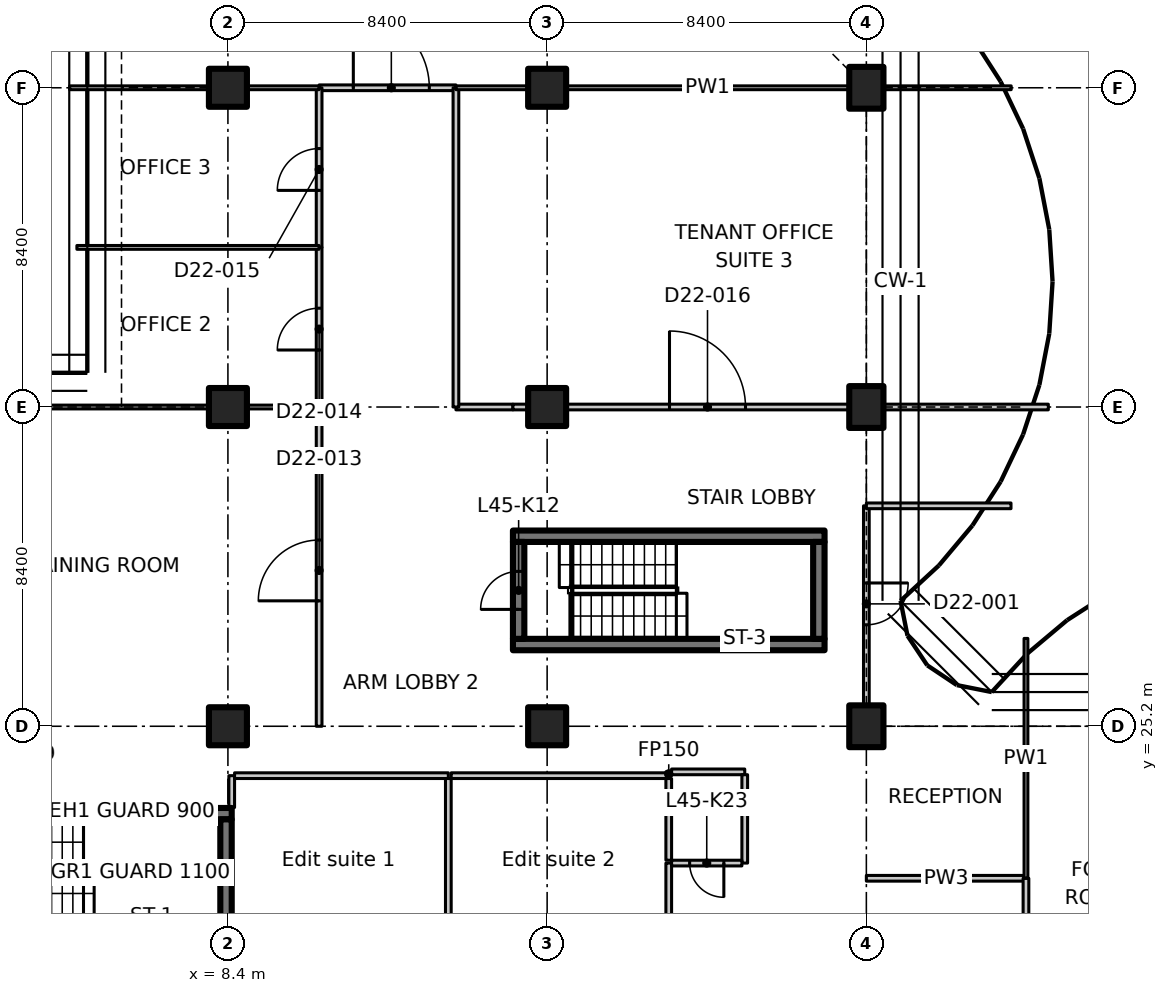
"""IFC4 building model, lengths in metres.
Left out: names, types, materials, properties, quantities, classifications, styles, units other than length and angle.
Written with IfcOpenShell. Run it as: python <this file> out.ifc"""

import sys

from ifc_helpers import new_model, si_unit, direction, frame, frame_2d, origin, origin_2d, place, context, subcontext, project, spatial, polyline, rectangle, outline, extrude, element, fill, save


model = new_model("IFC4")
c1 = context("Model", 3, precision=1e-05, world=origin(), true_north=direction((0.0, 1.0)))
c2 = subcontext(c1, "Body", "Model", "MODEL_VIEW")
j1 = project(units=[si_unit("LENGTHUNIT", "METRE"), si_unit("PLANEANGLEUNIT", "RADIAN")], contexts=[c1])
p1 = place(None, origin())
s1 = spatial("IfcSite", under=j1, at=p1, CompositionType="ELEMENT")
p2 = place(p1, origin())
s2 = spatial("IfcBuilding", under=s1, at=p2, CompositionType="ELEMENT")
p3 = place(p2, frame((0.0, 0.0, 181.2)))
s3 = spatial("IfcBuildingStorey", under=s2, at=p3, CompositionType="ELEMENT", Elevation=181.2)
for number, where, z_axis, x_axis in (
    (1, (8.4, 25.2, 0.0), (0.0, 0.0, 1.0), (1.0, 0.0, 0.0)),
    (2, (8.4, 33.6, 0.0), (0.0, 0.0, 1.0), (1.0, 0.0, 0.0)),
    (3, (8.4, 42.0, 0.0), (0.0, 0.0, 1.0), (1.0, 0.0, 0.0)),
    (4, (16.8, 25.2, 0.0), (0.0, 0.0, 1.0), (1.0, 0.0, 0.0)),
    (5, (16.8, 33.6, 0.0), (0.0, 0.0, 1.0), (1.0, 0.0, 0.0)),
    (6, (16.8, 42.0, 0.0), (0.0, 0.0, 1.0), (1.0, 0.0, 0.0)),
):
    element("IfcColumn", number, at=place(p3, frame(where, z_axis=z_axis, x_axis=x_axis)), inside=s3, PredefinedType="COLUMN", context=c2, shape_type="SweptSolid", body=[
        extrude(rectangle(XDim=1.0, YDim=1.0, at=origin_2d()), origin(), (0.0, 0.0, 1.0), 3.35),
    ])
for number, where, z_axis, x_axis in (
    (7, (25.2, 25.2, 0.0), (0.0, 0.0, 1.0), (1.0, 0.0, 0.0)),
    (8, (25.2, 33.6, 0.0), (0.0, 0.0, 1.0), (1.0, 0.0, 0.0)),
    (9, (25.2, 42.0, 0.0), (0.0, 0.0, 1.0), (1.0, 0.0, 0.0)),
):
    element("IfcColumn", number, at=place(p3, frame(where, z_axis=z_axis, x_axis=x_axis)), inside=s3, PredefinedType="COLUMN", context=c2, shape_type="SweptSolid", body=[
        extrude(rectangle(XDim=0.9, YDim=1.1, at=origin_2d()), origin(), (0.0, 0.0, 1.0), 3.35),
    ])
p4 = place(p3, frame((0.3, 22.9, 0.0), z_axis=(0.0, 0.0, 1.0), x_axis=(1.0, 0.0, 0.0)))
e10 = element("IfcWall", 10, at=p4, inside=s3, PredefinedType="SHEAR", context=c2, shape_type="SweptSolid", body=[
    extrude(rectangle(XDim=8.2, YDim=0.3, at=frame_2d((4.1, 0.0))), origin(), (0.0, 0.0, 1.0), 3.35),
])
p5 = place(p4, frame((0.4, 0.0, 0.0)))
e11 = element("IfcOpeningElement", 11, at=p5, cuts=e10, PredefinedType="OPENING", context=c2, shape_type="SweptSolid", body=[
    extrude(rectangle(XDim=1.0, YDim=2.1, at=frame_2d((0.5, 1.05))), frame((0.0, 0.16, 0.0), z_axis=(0.0, -1.0, 0.0), x_axis=(1.0, 0.0, 0.0)), (0.0, 0.0, 1.0), 0.32),
])
p6 = place(p3, frame((8.35, 20.2, 0.0), z_axis=(0.0, 0.0, 1.0), x_axis=(0.0, 1.0, 0.0)))
e12 = element("IfcWall", 12, at=p6, inside=s3, PredefinedType="SHEAR", context=c2, shape_type="SweptSolid", body=[
    extrude(rectangle(XDim=2.55, YDim=0.3, at=frame_2d((1.275, 0.0))), origin(), (0.0, 0.0, 1.0), 3.35),
])
for number, where, z_axis, x_axis in (
    (13, (15.9, 27.35, 0.0), (0.0, 0.0, 1.0), (1.0, 0.0, 0.0)),
    (14, (15.9, 30.2, 0.0), (0.0, 0.0, 1.0), (1.0, 0.0, 0.0)),
):
    element("IfcWall", number, at=place(p3, frame(where, z_axis=z_axis, x_axis=x_axis)), inside=s3, PredefinedType="SHEAR", context=c2, shape_type="SweptSolid", body=[
        extrude(rectangle(XDim=8.2, YDim=0.3, at=frame_2d((4.1, 0.0))), origin(), (0.0, 0.0, 1.0), 3.35),
    ])
p7 = place(p3, frame((16.05, 27.5, 0.0), z_axis=(0.0, 0.0, 1.0), x_axis=(0.0, 1.0, 0.0)))
e15 = element("IfcWall", 15, at=p7, inside=s3, PredefinedType="SHEAR", context=c2, shape_type="SweptSolid", body=[
    extrude(rectangle(XDim=2.55, YDim=0.3, at=frame_2d((1.275, 0.0))), origin(), (0.0, 0.0, 1.0), 3.35),
])
p8 = place(p7, frame((0.775, 0.0, 0.0)))
e16 = element("IfcOpeningElement", 16, at=p8, cuts=e15, PredefinedType="OPENING", context=c2, shape_type="SweptSolid", body=[
    extrude(rectangle(XDim=1.0, YDim=2.1, at=frame_2d((0.5, 1.05))), frame((0.0, 0.16, 0.0), z_axis=(0.0, -1.0, 0.0), x_axis=(1.0, 0.0, 0.0)), (0.0, 0.0, 1.0), 0.32),
])
p9 = place(p3, frame((23.95, 27.5, 0.0), z_axis=(0.0, 0.0, 1.0), x_axis=(0.0, 1.0, 0.0)))
e17 = element("IfcWall", 17, at=p9, inside=s3, PredefinedType="SHEAR", context=c2, shape_type="SweptSolid", body=[
    extrude(rectangle(XDim=2.55, YDim=0.3, at=frame_2d((1.275, 0.0))), origin(), (0.0, 0.0, 1.0), 3.35),
])
p10 = place(p3, frame((8.5, 23.062, 0.0), z_axis=(0.0, 0.0, 1.0), x_axis=(0.0, 1.0, 0.0)))
e18 = element("IfcWall", 18, at=p10, inside=s3, PredefinedType="PARTITIONING", context=c2, shape_type="SweptSolid", body=[
    extrude(rectangle(XDim=0.838, YDim=0.15, at=frame_2d((0.419, 0.0))), origin(), (0.0, 0.0, 1.0), 3.35),
])
p11 = place(p3, frame((8.575, 23.9, 0.0), z_axis=(0.0, 0.0, 1.0), x_axis=(1.0, 0.0, 0.0)))
e19 = element("IfcWall", 19, at=p11, inside=s3, PredefinedType="PARTITIONING", context=c2, shape_type="SweptSolid", body=[
    extrude(rectangle(XDim=5.625, YDim=0.15, at=frame_2d((2.812, 0.0))), origin(), (0.0, 0.0, 1.0), 3.35),
])
p12 = place(p3, frame((20.0, 21.6, 0.0), z_axis=(0.0, 0.0, 1.0), x_axis=(0.0, -1.0, 0.0)))
e20 = element("IfcWall", 20, at=p12, inside=s3, PredefinedType="PARTITIONING", context=c2, shape_type="SweptSolid", body=[
    extrude(rectangle(XDim=2.2, YDim=0.15, at=frame_2d((1.1, 0.0))), origin(), (0.0, 0.0, 1.0), 3.35),
])
p13 = place(p3, frame((14.2, 23.825, 0.0), z_axis=(0.0, 0.0, 1.0), x_axis=(0.0, -1.0, 0.0)))
e21 = element("IfcWall", 21, at=p13, inside=s3, PredefinedType="PARTITIONING", context=c2, shape_type="SweptSolid", body=[
    extrude(rectangle(XDim=4.35, YDim=0.15, at=frame_2d((2.175, 0.0))), origin(), (0.0, 0.0, 1.0), 3.35),
])
p14 = place(p3, frame((14.275, 23.9, 0.0), z_axis=(0.0, 0.0, 1.0), x_axis=(1.0, 0.0, 0.0)))
e22 = element("IfcWall", 22, at=p14, inside=s3, PredefinedType="PARTITIONING", context=c2, shape_type="SweptSolid", body=[
    extrude(rectangle(XDim=5.725, YDim=0.15, at=frame_2d((2.863, 0.0))), origin(), (0.0, 0.0, 1.0), 3.35),
])
p15 = place(p3, frame((20.0, 23.9, 0.0), z_axis=(0.0, 0.0, 1.0), x_axis=(0.0, 1.0, 0.0)))
e23 = element("IfcWall", 23, at=p15, inside=s3, PredefinedType="PARTITIONING", context=c2, shape_type="SweptSolid", body=[
    extrude(rectangle(XDim=0.1, YDim=0.15, at=frame_2d((0.05, 0.0))), origin(), (0.0, 0.0, 1.0), 3.35),
])
p16 = place(p3, frame((20.075, 24.0, 0.0), z_axis=(0.0, 0.0, 1.0), x_axis=(1.0, 0.0, 0.0)))
e24 = element("IfcWall", 24, at=p16, inside=s3, PredefinedType="PARTITIONING", context=c2, shape_type="SweptSolid", body=[
    extrude(rectangle(XDim=1.925, YDim=0.15, at=frame_2d((0.962, 0.0))), origin(), (0.0, 0.0, 1.0), 3.35),
])
p17 = place(p3, frame((22.0, 23.925, 0.0), z_axis=(0.0, 0.0, 1.0), x_axis=(0.0, -1.0, 0.0)))
e25 = element("IfcWall", 25, at=p17, inside=s3, PredefinedType="PARTITIONING", context=c2, shape_type="SweptSolid", body=[
    extrude(rectangle(XDim=2.325, YDim=0.15, at=frame_2d((1.163, 0.0))), origin(), (0.0, 0.0, 1.0), 3.35),
])
p18 = place(p3, frame((21.925, 21.6, 0.0), z_axis=(0.0, 0.0, 1.0), x_axis=(-1.0, 0.0, 0.0)))
e26 = element("IfcWall", 26, at=p18, inside=s3, PredefinedType="PARTITIONING", context=c2, shape_type="SweptSolid", body=[
    extrude(rectangle(XDim=1.85, YDim=0.15, at=frame_2d((0.925, 0.0))), origin(), (0.0, 0.0, 1.0), 3.35),
])
p19 = place(p18, frame((0.475, 0.0, 0.0)))
e27 = element("IfcOpeningElement", 27, at=p19, cuts=e26, PredefinedType="OPENING", context=c2, shape_type="SweptSolid", body=[
    extrude(rectangle(XDim=0.9, YDim=2.1, at=frame_2d((0.45, 1.05))), frame((0.0, 0.085, 0.0), z_axis=(0.0, -1.0, 0.0), x_axis=(1.0, 0.0, 0.0)), (0.0, 0.0, 1.0), 0.17),
])
p20 = place(p3, frame((20.0, 21.675, 0.0), z_axis=(0.0, 0.0, 1.0), x_axis=(0.0, 1.0, 0.0)))
e28 = element("IfcWall", 28, at=p20, inside=s3, PredefinedType="PARTITIONING", context=c2, shape_type="SweptSolid", body=[
    extrude(rectangle(XDim=2.15, YDim=0.15, at=frame_2d((1.075, 0.0))), origin(), (0.0, 0.0, 1.0), 3.35),
])
p21 = place(p3, frame((25.2, 21.2, 0.0), z_axis=(0.0, 0.0, 1.0), x_axis=(1.0, 0.0, 0.0)))
e29 = element("IfcWall", 29, at=p21, inside=s3, PredefinedType="PARTITIONING", context=c2, shape_type="SweptSolid", body=[
    extrude(rectangle(XDim=4.2, YDim=0.15, at=frame_2d((2.1, 0.0))), origin(), (0.0, 0.0, 1.0), 3.33),
])
p22 = place(p3, frame((29.4, 21.2, 0.0), z_axis=(0.0, 0.0, 1.0), x_axis=(0.0, -1.0, 0.0)))
e30 = element("IfcWall", 30, at=p22, inside=s3, PredefinedType="PARTITIONING", context=c2, shape_type="SweptSolid", body=[
    extrude(rectangle(XDim=8.2, YDim=0.15, at=frame_2d((4.1, 0.0))), origin(), (0.0, 0.0, 1.0), 3.33),
])
p23 = place(p3, frame((29.4, 27.511, 0.0), z_axis=(0.0, 0.0, 1.0), x_axis=(0.0, -1.0, 0.0)))
e31 = element("IfcWall", 31, at=p23, inside=s3, PredefinedType="PARTITIONING", context=c2, shape_type="SweptSolid", body=[
    extrude(outline(polyline([(0.0, 0.0), (6.311, 0.0), (6.311, 3.33), (2.761, 3.33), (2.759, 2.98), (1.863, 2.98), (1.861, 3.33), (0.236, 3.33), (0.0, 3.33), (0.0, 0.0)])), frame((0.0, 0.05, 0.0), z_axis=(0.0, -1.0, 0.0), x_axis=(1.0, 0.0, 0.0)), (0.0, 0.0, 1.0), 0.1),
])
p24 = place(p3, frame((25.2, 31.0, 0.0), z_axis=(0.0, 0.0, 1.0), x_axis=(0.0, -1.0, 0.0)))
e32 = element("IfcWall", 32, at=p24, inside=s3, PredefinedType="PARTITIONING", context=c2, shape_type="SweptSolid", body=[
    extrude(outline(polyline([(0.0, 0.0), (5.23, 0.0), (5.23, 2.98), (0.0, 2.98), (0.0, 0.0)])), frame((0.0, 0.075, 0.0), z_axis=(0.0, -1.0, 0.0), x_axis=(1.0, 0.0, 0.0)), (0.0, 0.0, 1.0), 0.15),
])
p25 = place(p24, frame((2.03, 0.0, 0.0)))
e33 = element("IfcOpeningElement", 33, at=p25, cuts=e32, PredefinedType="OPENING", context=c2, shape_type="SweptSolid", body=[
    extrude(rectangle(XDim=1.1, YDim=2.1, at=frame_2d((0.55, 1.05))), frame((0.0, 0.085, 0.0), z_axis=(0.0, -1.0, 0.0), x_axis=(1.0, 0.0, 0.0)), (0.0, 0.0, 1.0), 0.17),
])
p26 = place(p3, frame((25.2, 31.0, 0.0), z_axis=(0.0, 0.0, 1.0), x_axis=(1.0, 0.0, 0.0)))
e34 = element("IfcWall", 34, at=p26, inside=s3, PredefinedType="PARTITIONING", context=c2, shape_type="SweptSolid", body=[
    extrude(rectangle(XDim=3.806, YDim=0.15, at=frame_2d((1.903, 0.0))), origin(), (0.0, 0.0, 1.0), 2.98),
])
p27 = place(p3, frame((10.8, 25.2, 0.0), z_axis=(0.0, 0.0, 1.0), x_axis=(0.0, 1.0, 0.0)))
e35 = element("IfcWall", 35, at=p27, inside=s3, PredefinedType="PARTITIONING", context=c2, shape_type="SweptSolid", body=[
    extrude(rectangle(XDim=8.4, YDim=0.15, at=frame_2d((4.2, 0.0))), origin(), (0.0, 0.0, 1.0), 3.33),
])
p28 = place(p27, frame((3.3, 0.0, 0.0)))
e36 = element("IfcOpeningElement", 36, at=p28, cuts=e35, PredefinedType="OPENING", context=c2, shape_type="SweptSolid", body=[
    extrude(rectangle(XDim=1.6, YDim=2.1, at=frame_2d((0.8, 1.05))), frame((0.0, 0.085, 0.0), z_axis=(0.0, -1.0, 0.0), x_axis=(1.0, 0.0, 0.0)), (0.0, 0.0, 1.0), 0.17),
])
p29 = place(p3, frame((14.4, 33.6, 0.0), z_axis=(0.0, 0.0, 1.0), x_axis=(1.0, 0.0, 0.0)))
e37 = element("IfcWall", 37, at=p29, inside=s3, PredefinedType="PARTITIONING", context=c2, shape_type="SweptSolid", body=[
    extrude(rectangle(XDim=1.5, YDim=0.15, at=frame_2d((0.75, 0.0))), origin(), (0.0, 0.0, 1.0), 3.33),
])
p30 = place(p3, frame((15.9, 33.6, 0.0), z_axis=(0.0, 0.0, 1.0), x_axis=(1.0, 0.0, 0.0)))
e38 = element("IfcWall", 38, at=p30, inside=s3, PredefinedType="PARTITIONING", context=c2, shape_type="SweptSolid", body=[
    extrude(rectangle(XDim=0.38, YDim=0.15, at=frame_2d((0.19, 0.0))), origin(), (0.0, 0.0, 1.0), 3.33),
])
p31 = place(p3, frame((17.32, 33.6, 0.0), z_axis=(0.0, 0.0, 1.0), x_axis=(1.0, 0.0, 0.0)))
e39 = element("IfcWall", 39, at=p31, inside=s3, PredefinedType="PARTITIONING", context=c2, shape_type="SweptSolid", body=[
    extrude(rectangle(XDim=7.41, YDim=0.15, at=frame_2d((3.705, 0.0))), origin(), (0.0, 0.0, 1.0), 3.33),
])
p32 = place(p31, frame((2.7, 0.0, 0.0)))
e40 = element("IfcOpeningElement", 40, at=p32, cuts=e39, PredefinedType="OPENING", context=c2, shape_type="SweptSolid", body=[
    extrude(rectangle(XDim=2.0, YDim=2.4, at=frame_2d((1.0, 1.2))), frame((0.0, 0.085, 0.0), z_axis=(0.0, -1.0, 0.0), x_axis=(1.0, 0.0, 0.0)), (0.0, 0.0, 1.0), 0.17),
])
p33 = place(p3, frame((25.67, 33.6, 0.0), z_axis=(0.0, 0.0, 1.0), x_axis=(1.0, 0.0, 0.0)))
e41 = element("IfcWall", 41, at=p33, inside=s3, PredefinedType="PARTITIONING", context=c2, shape_type="SweptSolid", body=[
    extrude(rectangle(XDim=4.318, YDim=0.15, at=frame_2d((2.159, 0.0))), origin(), (0.0, 0.0, 1.0), 2.98),
])
p34 = place(p3, frame((10.8, 42.0, 0.0), z_axis=(0.0, 0.0, 1.0), x_axis=(1.0, 0.0, 0.0)))
e42 = element("IfcWall", 42, at=p34, inside=s3, PredefinedType="PARTITIONING", context=c2, shape_type="SweptSolid", body=[
    extrude(rectangle(XDim=3.6, YDim=0.15, at=frame_2d((1.8, 0.0))), origin(), (0.0, 0.0, 1.0), 3.33),
])
p35 = place(p34, frame((0.9, 0.0, 0.0)))
e43 = element("IfcOpeningElement", 43, at=p35, cuts=e42, PredefinedType="OPENING", context=c2, shape_type="SweptSolid", body=[
    extrude(rectangle(XDim=2.0, YDim=2.4, at=frame_2d((1.0, 1.2))), frame((0.0, 0.085, 0.0), z_axis=(0.0, -1.0, 0.0), x_axis=(1.0, 0.0, 0.0)), (0.0, 0.0, 1.0), 0.17),
])
p36 = place(p3, frame((10.8, 33.6, 0.0), z_axis=(0.0, 0.0, 1.0), x_axis=(0.0, 1.0, 0.0)))
e44 = element("IfcWall", 44, at=p36, inside=s3, PredefinedType="PARTITIONING", context=c2, shape_type="SweptSolid", body=[
    extrude(rectangle(XDim=4.2, YDim=0.15, at=frame_2d((2.1, 0.0))), origin(), (0.0, 0.0, 1.0), 3.33),
])
p37 = place(p36, frame((1.5, 0.0, 0.0)))
e45 = element("IfcOpeningElement", 45, at=p37, cuts=e44, PredefinedType="OPENING", context=c2, shape_type="SweptSolid", body=[
    extrude(rectangle(XDim=1.1, YDim=2.1, at=frame_2d((0.55, 1.05))), frame((0.0, 0.085, 0.0), z_axis=(0.0, -1.0, 0.0), x_axis=(1.0, 0.0, 0.0)), (0.0, 0.0, 1.0), 0.17),
])
p38 = place(p3, frame((10.8, 37.8, 0.0), z_axis=(0.0, 0.0, 1.0), x_axis=(0.0, 1.0, 0.0)))
e46 = element("IfcWall", 46, at=p38, inside=s3, PredefinedType="PARTITIONING", context=c2, shape_type="SweptSolid", body=[
    extrude(rectangle(XDim=4.2, YDim=0.15, at=frame_2d((2.1, 0.0))), origin(), (0.0, 0.0, 1.0), 3.33),
])
p39 = place(p38, frame((1.5, 0.0, 0.0)))
e47 = element("IfcOpeningElement", 47, at=p39, cuts=e46, PredefinedType="OPENING", context=c2, shape_type="SweptSolid", body=[
    extrude(rectangle(XDim=1.1, YDim=2.1, at=frame_2d((0.55, 1.05))), frame((0.0, 0.085, 0.0), z_axis=(0.0, -1.0, 0.0), x_axis=(1.0, 0.0, 0.0)), (0.0, 0.0, 1.0), 0.17),
])
p40 = place(p3, frame((14.4, 42.0, 0.0), z_axis=(0.0, 0.0, 1.0), x_axis=(0.0, -1.0, 0.0)))
e48 = element("IfcWall", 48, at=p40, inside=s3, PredefinedType="PARTITIONING", context=c2, shape_type="SweptSolid", body=[
    extrude(rectangle(XDim=8.4, YDim=0.15, at=frame_2d((4.2, 0.0))), origin(), (0.0, 0.0, 1.0), 3.33),
])
p41 = place(p3, frame((10.8, 42.0, 0.0), z_axis=(0.0, 0.0, 1.0), x_axis=(-1.0, 0.0, 0.0)))
e49 = element("IfcWall", 49, at=p41, inside=s3, PredefinedType="PARTITIONING", context=c2, shape_type="SweptSolid", body=[
    extrude(rectangle(XDim=1.88, YDim=0.1, at=frame_2d((0.94, 0.0))), origin(), (0.0, 0.0, 1.0), 3.33),
])
p42 = place(p3, frame((7.88, 42.0, 0.0), z_axis=(0.0, 0.0, 1.0), x_axis=(-1.0, 0.0, 0.0)))
e50 = element("IfcWall", 50, at=p42, inside=s3, PredefinedType="PARTITIONING", context=c2, shape_type="SweptSolid", body=[
    extrude(rectangle(XDim=3.645, YDim=0.1, at=frame_2d((1.822, 0.0))), origin(), (0.0, 0.0, 1.0), 2.98),
])
p43 = place(p3, frame((29.011, 42.0, 0.0), z_axis=(0.0, 0.0, 1.0), x_axis=(-1.0, 0.0, 0.0)))
e51 = element("IfcWall", 51, at=p43, inside=s3, PredefinedType="PARTITIONING", context=c2, shape_type="SweptSolid", body=[
    extrude(rectangle(XDim=3.342, YDim=0.1, at=frame_2d((1.671, 0.0))), origin(), (0.0, 0.0, 1.0), 2.98),
])
p44 = place(p3, frame((24.73, 42.0, 0.0), z_axis=(0.0, 0.0, 1.0), x_axis=(-1.0, 0.0, 0.0)))
e52 = element("IfcWall", 52, at=p44, inside=s3, PredefinedType="PARTITIONING", context=c2, shape_type="SweptSolid", body=[
    extrude(outline(polyline([(0.0, 0.0), (7.41, 0.0), (7.41, 3.33), (0.196, 3.33), (0.194, 2.98), (0.0, 2.98), (0.0, 0.0)])), frame((0.0, 0.05, 0.0), z_axis=(0.0, -1.0, 0.0), x_axis=(1.0, 0.0, 0.0)), (0.0, 0.0, 1.0), 0.1),
])
p45 = place(p3, frame((16.28, 42.0, 0.0), z_axis=(0.0, 0.0, 1.0), x_axis=(-1.0, 0.0, 0.0)))
e53 = element("IfcWall", 53, at=p45, inside=s3, PredefinedType="PARTITIONING", context=c2, shape_type="SweptSolid", body=[
    extrude(rectangle(XDim=1.88, YDim=0.1, at=frame_2d((0.94, 0.0))), origin(), (0.0, 0.0, 1.0), 3.33),
])
p46 = place(p3, frame((0.47, 33.6, 0.0), z_axis=(0.0, 0.0, 1.0), x_axis=(1.0, 0.0, 0.0)))
e54 = element("IfcWall", 54, at=p46, inside=s3, PredefinedType="PARTITIONING", context=c2, shape_type="SweptSolid", body=[
    extrude(outline(polyline([(0.0, 0.0), (7.41, 0.0), (7.41, 2.98), (0.0, 2.98), (0.0, 0.0)])), frame((0.0, 0.05, 0.0), z_axis=(0.0, -1.0, 0.0), x_axis=(1.0, 0.0, 0.0)), (0.0, 0.0, 1.0), 0.1),
])
p47 = place(p3, frame((8.92, 33.6, 0.0), z_axis=(0.0, 0.0, 1.0), x_axis=(1.0, 0.0, 0.0)))
e55 = element("IfcWall", 55, at=p47, inside=s3, PredefinedType="PARTITIONING", context=c2, shape_type="SweptSolid", body=[
    extrude(rectangle(XDim=1.88, YDim=0.1, at=frame_2d((0.94, 0.0))), origin(), (0.0, 0.0, 1.0), 3.33),
])
p48 = place(p3, frame((4.426, 37.8, 0.0), z_axis=(0.0, 0.0, 1.0), x_axis=(1.0, 0.0, 0.0)))
e56 = element("IfcWall", 56, at=p48, inside=s3, PredefinedType="PARTITIONING", context=c2, shape_type="SweptSolid", body=[
    extrude(outline(polyline([(0.0, 0.0), (6.374, 0.0), (6.374, 3.33), (1.624, 3.33), (1.622, 2.98), (0.726, 2.98), (0.724, 3.33), (0.074, 3.33), (0.0, 3.33), (0.0, 0.0)])), frame((0.0, 0.05, 0.0), z_axis=(0.0, -1.0, 0.0), x_axis=(1.0, 0.0, 0.0)), (0.0, 0.0, 1.0), 0.1),
])
p49 = place(p8, origin())
e57 = element("IfcDoor", 57, at=p49, inside=s3, OperationType="SINGLE_SWING_LEFT", PredefinedType="DOOR", context=c2, shape_type="SweptSolid", body=[
    extrude(rectangle(XDim=1.0, YDim=2.1, at=frame_2d((0.5, 1.05))), frame((0.0, 0.025, 0.0), z_axis=(0.0, -1.0, 0.0), x_axis=(1.0, 0.0, 0.0)), (0.0, 0.0, 1.0), 0.05),
])
fill(e16, e57)
p50 = place(p19, origin())
e58 = element("IfcDoor", 58, at=p50, inside=s3, OperationType="SINGLE_SWING_RIGHT", PredefinedType="DOOR", context=c2, shape_type="SweptSolid", body=[
    extrude(rectangle(XDim=0.9, YDim=2.1, at=frame_2d((0.45, 1.05))), frame((0.0, 0.025, 0.0), z_axis=(0.0, -1.0, 0.0), x_axis=(1.0, 0.0, 0.0)), (0.0, 0.0, 1.0), 0.05),
])
fill(e27, e58)
p51 = place(p25, origin())
e59 = element("IfcDoor", 59, at=p51, inside=s3, OperationType="SINGLE_SWING_RIGHT", PredefinedType="DOOR", context=c2, shape_type="SweptSolid", body=[
    extrude(rectangle(XDim=1.1, YDim=2.1, at=frame_2d((0.55, 1.05))), frame((0.0, 0.025, 0.0), z_axis=(0.0, -1.0, 0.0), x_axis=(1.0, 0.0, 0.0)), (0.0, 0.0, 1.0), 0.05),
])
fill(e33, e59)
p52 = place(p35, origin())
e60 = element("IfcDoor", 60, at=p52, inside=s3, OperationType="DOUBLE_DOOR_SINGLE_SWING", PredefinedType="DOOR", context=c2, shape_type="SweptSolid", body=[
    extrude(rectangle(XDim=2.0, YDim=2.4, at=frame_2d((1.0, 1.2))), frame((0.0, 0.025, 0.0), z_axis=(0.0, -1.0, 0.0), x_axis=(1.0, 0.0, 0.0)), (0.0, 0.0, 1.0), 0.05),
])
fill(e43, e60)
p53 = place(p28, origin())
e61 = element("IfcDoor", 61, at=p53, inside=s3, OperationType="DOUBLE_DOOR_SINGLE_SWING", PredefinedType="DOOR", context=c2, shape_type="SweptSolid", body=[
    extrude(rectangle(XDim=1.6, YDim=2.1, at=frame_2d((0.8, 1.05))), frame((0.0, 0.025, 0.0), z_axis=(0.0, -1.0, 0.0), x_axis=(1.0, 0.0, 0.0)), (0.0, 0.0, 1.0), 0.05),
])
fill(e36, e61)
p54 = place(p37, origin())
e62 = element("IfcDoor", 62, at=p54, inside=s3, OperationType="SINGLE_SWING_LEFT", PredefinedType="DOOR", context=c2, shape_type="SweptSolid", body=[
    extrude(rectangle(XDim=1.1, YDim=2.1, at=frame_2d((0.55, 1.05))), frame((0.0, 0.025, 0.0), z_axis=(0.0, -1.0, 0.0), x_axis=(1.0, 0.0, 0.0)), (0.0, 0.0, 1.0), 0.05),
])
fill(e45, e62)
p55 = place(p39, origin())
e63 = element("IfcDoor", 63, at=p55, inside=s3, OperationType="SINGLE_SWING_LEFT", PredefinedType="DOOR", context=c2, shape_type="SweptSolid", body=[
    extrude(rectangle(XDim=1.1, YDim=2.1, at=frame_2d((0.55, 1.05))), frame((0.0, 0.025, 0.0), z_axis=(0.0, -1.0, 0.0), x_axis=(1.0, 0.0, 0.0)), (0.0, 0.0, 1.0), 0.05),
])
fill(e47, e63)
p56 = place(p32, origin())
e64 = element("IfcDoor", 64, at=p56, inside=s3, OperationType="DOUBLE_DOOR_SINGLE_SWING", PredefinedType="DOOR", context=c2, shape_type="SweptSolid", body=[
    extrude(rectangle(XDim=2.0, YDim=2.4, at=frame_2d((1.0, 1.2))), frame((0.0, 0.025, 0.0), z_axis=(0.0, -1.0, 0.0), x_axis=(1.0, 0.0, 0.0)), (0.0, 0.0, 1.0), 0.05),
])
fill(e40, e64)
save(model, sys.argv[1])
